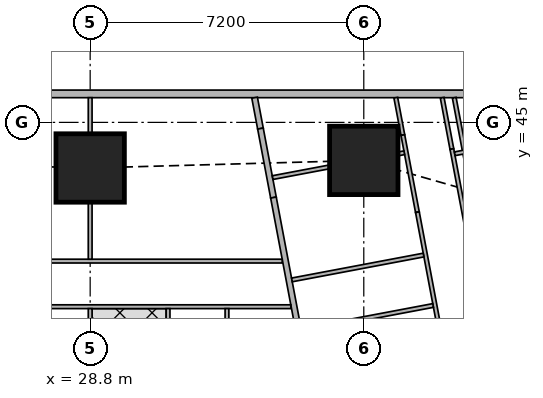
"""IFC4 building model, lengths in metres.
Left out: names, types, materials, properties, quantities, classifications, styles, units other than length and angle.
Written with IfcOpenShell. Run it as: python <this file> out.ifc"""

import sys

from ifc_helpers import new_model, si_unit, direction, frame, frame_2d, origin, origin_2d, place, context, subcontext, project, spatial, rectangle, extrude, element, fill, save


model = new_model("IFC4")
c1 = context("Model", 3, precision=1e-05, world=origin(), true_north=direction((0.0, 1.0)))
c2 = subcontext(c1, "Body", "Model", "MODEL_VIEW")
j1 = project(units=[si_unit("LENGTHUNIT", "METRE"), si_unit("PLANEANGLEUNIT", "RADIAN")], contexts=[c1])
p1 = place(None, origin())
s1 = spatial("IfcSite", under=j1, at=p1, CompositionType="ELEMENT")
p2 = place(p1, origin())
s2 = spatial("IfcBuilding", under=s1, at=p2, CompositionType="ELEMENT")
p3 = place(p2, frame((0.0, 0.0, 158.3)))
s3 = spatial("IfcBuildingStorey", under=s2, at=p3, CompositionType="ELEMENT", Elevation=158.3)
for number, where, z_axis, x_axis in (
    (1, (28.8, 43.8, 0.0), (0.0, 0.0, 1.0), (1.0, 0.0, 0.0)),
    (2, (36.0, 44.0, 0.0), (0.0, 0.0, 1.0), (1.0, 0.0, 0.0)),
):
    element("IfcColumn", number, at=place(p3, frame(where, z_axis=z_axis, x_axis=x_axis)), inside=s3, PredefinedType="COLUMN", context=c2, shape_type="SweptSolid", body=[
        extrude(rectangle(XDim=1.8, YDim=1.8, at=origin_2d()), origin(), (0.0, 0.0, 1.0), 3.75),
    ])
p4 = place(p3, frame((40.106, 45.75, 0.0), z_axis=(0.0, 0.0, 1.0), x_axis=(-1.0, 0.0, 0.0)))
e3 = element("IfcWall", 3, at=p4, inside=s3, PredefinedType="SOLIDWALL", context=c2, shape_type="SweptSolid", body=[
    extrude(rectangle(XDim=37.943, YDim=0.2, at=frame_2d((18.971, 0.0))), origin(), (0.0, 0.0, 1.0), 3.5),
])
p5 = place(p4, frame((8.606, 0.0, 0.9)))
e4 = element("IfcOpeningElement", 4, at=p5, cuts=e3, PredefinedType="OPENING", context=c2, shape_type="SweptSolid", body=[
    extrude(rectangle(XDim=1.8, YDim=1.5, at=frame_2d((0.9, 0.75))), frame((0.0, 0.11, 0.0), z_axis=(0.0, -1.0, 0.0), x_axis=(1.0, 0.0, 0.0)), (0.0, 0.0, 1.0), 0.22),
])
p6 = place(p4, frame((12.206, 0.0, 0.9)))
e5 = element("IfcOpeningElement", 5, at=p6, cuts=e3, PredefinedType="OPENING", context=c2, shape_type="SweptSolid", body=[
    extrude(rectangle(XDim=1.8, YDim=1.5, at=frame_2d((0.9, 0.75))), frame((0.0, 0.11, 0.0), z_axis=(0.0, -1.0, 0.0), x_axis=(1.0, 0.0, 0.0)), (0.0, 0.0, 1.0), 0.22),
])
p7 = place(p4, frame((15.806, 0.0, 0.9)))
e6 = element("IfcOpeningElement", 6, at=p7, cuts=e3, PredefinedType="OPENING", context=c2, shape_type="SweptSolid", body=[
    extrude(rectangle(XDim=1.8, YDim=1.5, at=frame_2d((0.9, 0.75))), frame((0.0, 0.11, 0.0), z_axis=(0.0, -1.0, 0.0), x_axis=(1.0, 0.0, 0.0)), (0.0, 0.0, 1.0), 0.22),
])
p8 = place(p4, frame((19.406, 0.0, 0.9)))
e7 = element("IfcOpeningElement", 7, at=p8, cuts=e3, PredefinedType="OPENING", context=c2, shape_type="SweptSolid", body=[
    extrude(rectangle(XDim=1.8, YDim=1.5, at=frame_2d((0.9, 0.75))), frame((0.0, 0.11, 0.0), z_axis=(0.0, -1.0, 0.0), x_axis=(1.0, 0.0, 0.0)), (0.0, 0.0, 1.0), 0.22),
])
p9 = place(p4, frame((23.006, 0.0, 0.9)))
e8 = element("IfcOpeningElement", 8, at=p9, cuts=e3, PredefinedType="OPENING", context=c2, shape_type="SweptSolid", body=[
    extrude(rectangle(XDim=1.8, YDim=1.5, at=frame_2d((0.9, 0.75))), frame((0.0, 0.11, 0.0), z_axis=(0.0, -1.0, 0.0), x_axis=(1.0, 0.0, 0.0)), (0.0, 0.0, 1.0), 0.22),
])
p10 = place(p4, frame((26.606, 0.0, 0.9)))
e9 = element("IfcOpeningElement", 9, at=p10, cuts=e3, PredefinedType="OPENING", context=c2, shape_type="SweptSolid", body=[
    extrude(rectangle(XDim=1.8, YDim=1.5, at=frame_2d((0.9, 0.75))), frame((0.0, 0.11, 0.0), z_axis=(0.0, -1.0, 0.0), x_axis=(1.0, 0.0, 0.0)), (0.0, 0.0, 1.0), 0.22),
])
p11 = place(p3, frame((33.127, 45.65, 0.0), z_axis=(0.0, 0.0, 1.0), x_axis=(0.186176514576, -0.982516313056, 0.0)))
e10 = element("IfcWall", 10, at=p11, inside=s3, PredefinedType="SOLIDWALL", context=c2, shape_type="SweptSolid", body=[
    extrude(rectangle(XDim=0.827, YDim=0.15, at=frame_2d((0.414, 0.0))), origin(), (0.0, 0.0, 1.0), 3.5),
])
p12 = place(p3, frame((33.281, 44.837, 0.0), z_axis=(0.0, 0.0, 1.0), x_axis=(0.185198323004, -0.982701165745, 0.0)))
e11 = element("IfcWall", 11, at=p12, inside=s3, PredefinedType="SOLIDWALL", context=c2, shape_type="SweptSolid", body=[
    extrude(rectangle(XDim=1.847, YDim=0.15, at=frame_2d((0.923, 0.0))), origin(), (0.0, 0.0, 1.0), 2.1),
])
p13 = place(p3, frame((33.623, 43.022, 0.0), z_axis=(0.0, 0.0, 1.0), x_axis=(0.185596841028, -0.98262597798, 0.0)))
e12 = element("IfcWall", 12, at=p13, inside=s3, PredefinedType="SOLIDWALL", context=c2, shape_type="SweptSolid", body=[
    extrude(rectangle(XDim=41.66, YDim=0.15, at=frame_2d((20.83, 0.0))), origin(), (0.0, 0.0, 1.0), 2.5),
])
p14 = place(p13, frame((21.514, 0.0, 0.0)))
e13 = element("IfcOpeningElement", 13, at=p14, cuts=e12, PredefinedType="OPENING", context=c2, shape_type="SweptSolid", body=[
    extrude(rectangle(XDim=1.0, YDim=2.1, at=frame_2d((0.5, 1.05))), frame((0.0, 0.085, 0.0), z_axis=(0.0, -1.0, 0.0), x_axis=(1.0, 0.0, 0.0)), (0.0, 0.0, 1.0), 0.17),
])
p15 = place(p13, frame((27.062, 0.0, 0.0)))
e14 = element("IfcOpeningElement", 14, at=p15, cuts=e12, PredefinedType="OPENING", context=c2, shape_type="SweptSolid", body=[
    extrude(rectangle(XDim=1.0, YDim=2.1, at=frame_2d((0.5, 1.05))), frame((0.0, 0.085, 0.0), z_axis=(0.0, -1.0, 0.0), x_axis=(1.0, 0.0, 0.0)), (0.0, 0.0, 1.0), 0.17),
])
p16 = place(p13, frame((29.934, 0.0, 0.0)))
e15 = element("IfcOpeningElement", 15, at=p16, cuts=e12, PredefinedType="OPENING", context=c2, shape_type="SweptSolid", body=[
    extrude(rectangle(XDim=1.0, YDim=2.1, at=frame_2d((0.5, 1.05))), frame((0.0, 0.085, 0.0), z_axis=(0.0, -1.0, 0.0), x_axis=(1.0, 0.0, 0.0)), (0.0, 0.0, 1.0), 0.17),
])
p17 = place(p3, frame((39.054, 42.085, 0.0), z_axis=(0.0, 0.0, 1.0), x_axis=(-0.185791584218, 0.982589175207, 0.0)))
e16 = element("IfcWall", 16, at=p17, inside=s3, PredefinedType="PARTITIONING", context=c2, shape_type="SweptSolid", body=[
    extrude(rectangle(XDim=3.628, YDim=0.1, at=frame_2d((1.814, 0.0))), origin(), (0.0, 0.0, 1.0), 2.1),
])
p18 = place(p3, frame((38.063, 45.65, 0.0), z_axis=(0.0, 0.0, 1.0), x_axis=(0.185456359766, -0.982652501458, 0.0)))
e17 = element("IfcWall", 17, at=p18, inside=s3, PredefinedType="PARTITIONING", context=c2, shape_type="SweptSolid", body=[
    extrude(rectangle(XDim=1.376, YDim=0.1, at=frame_2d((0.688, 0.0))), origin(), (0.0, 0.0, 1.0), 3.5),
])
p19 = place(p3, frame((38.318, 44.298, 0.0), z_axis=(0.0, 0.0, 1.0), x_axis=(0.185481135188, -0.982647825261, 0.0)))
e18 = element("IfcWall", 18, at=p19, inside=s3, PredefinedType="PARTITIONING", context=c2, shape_type="SweptSolid", body=[
    extrude(rectangle(XDim=2.064, YDim=0.1, at=frame_2d((1.032, 0.0))), origin(), (0.0, 0.0, 1.0), 2.1),
])
p20 = place(p3, frame((36.842, 45.65, 0.0), z_axis=(0.0, 0.0, 1.0), x_axis=(0.185789875365, -0.982589498322, 0.0)))
e19 = element("IfcWall", 19, at=p20, inside=s3, PredefinedType="PARTITIONING", context=c2, shape_type="SweptSolid", body=[
    extrude(rectangle(XDim=1.001, YDim=0.1, at=frame_2d((0.5, 0.0))), origin(), (0.0, 0.0, 1.0), 3.5),
])
p21 = place(p3, frame((37.028, 44.666, 0.0), z_axis=(0.0, 0.0, 1.0), x_axis=(0.185481135188, -0.982647825261, 0.0)))
e20 = element("IfcWall", 20, at=p21, inside=s3, PredefinedType="PARTITIONING", context=c2, shape_type="SweptSolid", body=[
    extrude(rectangle(XDim=2.064, YDim=0.1, at=frame_2d((1.032, 0.0))), origin(), (0.0, 0.0, 1.0), 2.1),
])
p22 = place(p3, frame((37.411, 42.638, 0.0), z_axis=(0.0, 0.0, 1.0), x_axis=(0.185554598549, -0.982633955732, 0.0)))
e21 = element("IfcWall", 21, at=p22, inside=s3, PredefinedType="PARTITIONING", context=c2, shape_type="SweptSolid", body=[
    extrude(rectangle(XDim=18.976, YDim=0.1, at=frame_2d((9.488, 0.0))), origin(), (0.0, 0.0, 1.0), 2.5),
])
p23 = place(p22, frame((17.551, 0.0, 0.0)))
e22 = element("IfcOpeningElement", 22, at=p23, cuts=e21, PredefinedType="OPENING", context=c2, shape_type="SweptSolid", body=[
    extrude(rectangle(XDim=0.9, YDim=2.1, at=frame_2d((0.45, 1.05))), frame((0.0, 0.06, 0.0), z_axis=(0.0, -1.0, 0.0), x_axis=(1.0, 0.0, 0.0)), (0.0, 0.0, 1.0), 0.12),
])
p24 = place(p22, frame((13.959, 0.0, 0.0)))
e23 = element("IfcOpeningElement", 23, at=p24, cuts=e21, PredefinedType="OPENING", context=c2, shape_type="SweptSolid", body=[
    extrude(rectangle(XDim=0.9, YDim=2.1, at=frame_2d((0.45, 1.05))), frame((0.0, 0.06, 0.0), z_axis=(0.0, -1.0, 0.0), x_axis=(1.0, 0.0, 0.0)), (0.0, 0.0, 1.0), 0.12),
])
p25 = place(p22, frame((10.092, 0.0, 0.0)))
e24 = element("IfcOpeningElement", 24, at=p25, cuts=e21, PredefinedType="OPENING", context=c2, shape_type="SweptSolid", body=[
    extrude(rectangle(XDim=0.9, YDim=2.1, at=frame_2d((0.45, 1.05))), frame((0.0, 0.06, 0.0), z_axis=(0.0, -1.0, 0.0), x_axis=(1.0, 0.0, 0.0)), (0.0, 0.0, 1.0), 0.12),
])
p26 = place(p22, frame((5.731, 0.0, 0.0)))
e25 = element("IfcOpeningElement", 25, at=p26, cuts=e21, PredefinedType="OPENING", context=c2, shape_type="SweptSolid", body=[
    extrude(rectangle(XDim=0.9, YDim=2.1, at=frame_2d((0.45, 1.05))), frame((0.0, 0.06, 0.0), z_axis=(0.0, -1.0, 0.0), x_axis=(1.0, 0.0, 0.0)), (0.0, 0.0, 1.0), 0.12),
])
p27 = place(p22, frame((3.188, 0.0, 0.0)))
e26 = element("IfcOpeningElement", 26, at=p27, cuts=e21, PredefinedType="OPENING", context=c2, shape_type="SweptSolid", body=[
    extrude(rectangle(XDim=0.9, YDim=2.1, at=frame_2d((0.45, 1.05))), frame((0.0, 0.06, 0.0), z_axis=(0.0, -1.0, 0.0), x_axis=(1.0, 0.0, 0.0)), (0.0, 0.0, 1.0), 0.12),
])
p28 = place(p22, frame((0.15, 0.0, 0.0)))
e27 = element("IfcOpeningElement", 27, at=p28, cuts=e21, PredefinedType="OPENING", context=c2, shape_type="SweptSolid", body=[
    extrude(rectangle(XDim=0.9, YDim=2.1, at=frame_2d((0.45, 1.05))), frame((0.0, 0.06, 0.0), z_axis=(0.0, -1.0, 0.0), x_axis=(1.0, 0.0, 0.0)), (0.0, 0.0, 1.0), 0.12),
])
p29 = place(p22, frame((15.642, 0.0, 0.0)))
e28 = element("IfcOpeningElement", 28, at=p29, cuts=e21, PredefinedType="OPENING", context=c2, shape_type="SweptSolid", body=[
    extrude(rectangle(XDim=0.9, YDim=2.1, at=frame_2d((0.45, 1.05))), frame((0.0, 0.06, 0.0), z_axis=(0.0, -1.0, 0.0), x_axis=(1.0, 0.0, 0.0)), (0.0, 0.0, 1.0), 0.12),
])
p30 = place(p22, frame((12.051, 0.0, 0.0)))
e29 = element("IfcOpeningElement", 29, at=p30, cuts=e21, PredefinedType="OPENING", context=c2, shape_type="SweptSolid", body=[
    extrude(rectangle(XDim=0.9, YDim=2.1, at=frame_2d((0.45, 1.05))), frame((0.0, 0.06, 0.0), z_axis=(0.0, -1.0, 0.0), x_axis=(1.0, 0.0, 0.0)), (0.0, 0.0, 1.0), 0.12),
])
p31 = place(p22, frame((8.185, 0.0, 0.0)))
e30 = element("IfcOpeningElement", 30, at=p31, cuts=e21, PredefinedType="OPENING", context=c2, shape_type="SweptSolid", body=[
    extrude(rectangle(XDim=0.9, YDim=2.1, at=frame_2d((0.45, 1.05))), frame((0.0, 0.06, 0.0), z_axis=(0.0, -1.0, 0.0), x_axis=(1.0, 0.0, 0.0)), (0.0, 0.0, 1.0), 0.12),
])
p32 = place(p3, frame((41.968, 44.85, 0.0), z_axis=(0.0, 0.0, 1.0), x_axis=(-0.98258614234, -0.185807623311, 0.0)))
e31 = element("IfcWall", 31, at=p32, inside=s3, PredefinedType="PARTITIONING", context=c2, shape_type="SweptSolid", body=[
    extrude(rectangle(XDim=3.638, YDim=0.1, at=frame_2d((1.819, 0.0))), origin(), (0.0, 0.0, 1.0), 2.1),
])
p33 = place(p3, frame((37.065, 44.201, 0.0), z_axis=(0.0, 0.0, 1.0), x_axis=(-0.983168876381, -0.182699098288, 0.0)))
e32 = element("IfcWall", 32, at=p33, inside=s3, PredefinedType="PARTITIONING", context=c2, shape_type="SweptSolid", body=[
    extrude(rectangle(XDim=0.158, YDim=0.1, at=frame_2d((0.079, 0.0))), origin(), (0.0, 0.0, 1.0), 2.1),
])
p34 = place(p3, frame((35.09, 43.828, 0.0), z_axis=(0.0, 0.0, 1.0), x_axis=(-0.982683801717, -0.185290436461, 0.0)))
e33 = element("IfcWall", 33, at=p34, inside=s3, PredefinedType="PARTITIONING", context=c2, shape_type="SweptSolid", body=[
    extrude(rectangle(XDim=1.515, YDim=0.1, at=frame_2d((0.758, 0.0))), origin(), (0.0, 0.0, 1.0), 2.1),
])
p35 = place(p3, frame((37.824, 40.182, 0.0), z_axis=(0.0, 0.0, 1.0), x_axis=(-0.982648794755, -0.185475998897, 0.0)))
e34 = element("IfcWall", 34, at=p35, inside=s3, PredefinedType="PARTITIONING", context=c2, shape_type="SweptSolid", body=[
    extrude(rectangle(XDim=3.525, YDim=0.1, at=frame_2d((1.763, 0.0))), origin(), (0.0, 0.0, 1.0), 3.5),
])
p36 = place(p3, frame((21.6, 41.35, 0.0), z_axis=(0.0, 0.0, 1.0), x_axis=(1.0, 0.0, 0.0)))
e35 = element("IfcWall", 35, at=p36, inside=s3, PredefinedType="PARTITIONING", context=c2, shape_type="SweptSolid", body=[
    extrude(rectangle(XDim=12.253, YDim=0.1, at=frame_2d((6.126, 0.0))), origin(), (0.0, 0.0, 1.0), 3.5),
])
p37 = place(p36, frame((0.2, 0.0, 0.0)))
e36 = element("IfcOpeningElement", 36, at=p37, cuts=e35, PredefinedType="OPENING", context=c2, shape_type="SweptSolid", body=[
    extrude(rectangle(XDim=0.9, YDim=2.1, at=frame_2d((0.45, 1.05))), frame((0.0, 0.06, 0.0), z_axis=(0.0, -1.0, 0.0), x_axis=(1.0, 0.0, 0.0)), (0.0, 0.0, 1.0), 0.12),
])
p38 = place(p36, frame((3.8, 0.0, 0.0)))
e37 = element("IfcOpeningElement", 37, at=p38, cuts=e35, PredefinedType="OPENING", context=c2, shape_type="SweptSolid", body=[
    extrude(rectangle(XDim=0.9, YDim=2.1, at=frame_2d((0.45, 1.05))), frame((0.0, 0.06, 0.0), z_axis=(0.0, -1.0, 0.0), x_axis=(1.0, 0.0, 0.0)), (0.0, 0.0, 1.0), 0.12),
])
p39 = place(p36, frame((7.4, 0.0, 0.0)))
e38 = element("IfcOpeningElement", 38, at=p39, cuts=e35, PredefinedType="OPENING", context=c2, shape_type="SweptSolid", body=[
    extrude(rectangle(XDim=0.9, YDim=2.1, at=frame_2d((0.45, 1.05))), frame((0.0, 0.06, 0.0), z_axis=(0.0, -1.0, 0.0), x_axis=(1.0, 0.0, 0.0)), (0.0, 0.0, 1.0), 0.12),
])
p40 = place(p3, frame((21.6, 40.15, 0.0), z_axis=(0.0, 0.0, 1.0), x_axis=(1.0, 0.0, 0.0)))
e39 = element("IfcWall", 39, at=p40, inside=s3, PredefinedType="PARTITIONING", context=c2, shape_type="SweptSolid", body=[
    extrude(rectangle(XDim=12.48, YDim=0.1, at=frame_2d((6.24, 0.0))), origin(), (0.0, 0.0, 1.0), 3.5),
])
p41 = place(p40, frame((0.4, 0.0, 0.0)))
e40 = element("IfcOpeningElement", 40, at=p41, cuts=e39, PredefinedType="OPENING", context=c2, shape_type="SweptSolid", body=[
    extrude(rectangle(XDim=0.9, YDim=2.1, at=frame_2d((0.45, 1.05))), frame((0.0, 0.06, 0.0), z_axis=(0.0, -1.0, 0.0), x_axis=(1.0, 0.0, 0.0)), (0.0, 0.0, 1.0), 0.12),
])
p42 = place(p40, frame((5.549, 0.0, 0.0)))
e41 = element("IfcOpeningElement", 41, at=p42, cuts=e39, PredefinedType="OPENING", context=c2, shape_type="SweptSolid", body=[
    extrude(rectangle(XDim=0.9, YDim=2.1, at=frame_2d((0.45, 1.05))), frame((0.0, 0.06, 0.0), z_axis=(0.0, -1.0, 0.0), x_axis=(1.0, 0.0, 0.0)), (0.0, 0.0, 1.0), 0.12),
])
p43 = place(p40, frame((7.775, 0.0, 0.0)))
e42 = element("IfcOpeningElement", 42, at=p43, cuts=e39, PredefinedType="OPENING", context=c2, shape_type="SweptSolid", body=[
    extrude(rectangle(XDim=0.9, YDim=2.1, at=frame_2d((0.45, 1.05))), frame((0.0, 0.06, 0.0), z_axis=(0.0, -1.0, 0.0), x_axis=(1.0, 0.0, 0.0)), (0.0, 0.0, 1.0), 0.12),
])
p44 = place(p40, frame((11.43, 0.0, 0.0)))
e43 = element("IfcOpeningElement", 43, at=p44, cuts=e39, PredefinedType="OPENING", context=c2, shape_type="SweptSolid", body=[
    extrude(rectangle(XDim=0.9, YDim=2.1, at=frame_2d((0.45, 1.05))), frame((0.0, 0.06, 0.0), z_axis=(0.0, -1.0, 0.0), x_axis=(1.0, 0.0, 0.0)), (0.0, 0.0, 1.0), 0.12),
])
p45 = place(p40, frame((2.799, 0.0, 0.0)))
e44 = element("IfcOpeningElement", 44, at=p45, cuts=e39, PredefinedType="OPENING", context=c2, shape_type="SweptSolid", body=[
    extrude(rectangle(XDim=0.9, YDim=2.1, at=frame_2d((0.45, 1.05))), frame((0.0, 0.06, 0.0), z_axis=(0.0, -1.0, 0.0), x_axis=(1.0, 0.0, 0.0)), (0.0, 0.0, 1.0), 0.12),
])
p46 = place(p40, frame((9.575, 0.0, 0.0)))
e45 = element("IfcOpeningElement", 45, at=p46, cuts=e39, PredefinedType="OPENING", context=c2, shape_type="SweptSolid", body=[
    extrude(rectangle(XDim=0.9, YDim=2.1, at=frame_2d((0.45, 1.05))), frame((0.0, 0.06, 0.0), z_axis=(0.0, -1.0, 0.0), x_axis=(1.0, 0.0, 0.0)), (0.0, 0.0, 1.0), 0.12),
])
p47 = place(p3, frame((28.8, 41.4, 0.0), z_axis=(0.0, 0.0, 1.0), x_axis=(0.0, 1.0, 0.0)))
e46 = element("IfcWall", 46, at=p47, inside=s3, PredefinedType="PARTITIONING", context=c2, shape_type="SweptSolid", body=[
    extrude(rectangle(XDim=1.499, YDim=0.1, at=frame_2d((0.75, 0.0))), origin(), (0.0, 0.0, 1.0), 3.5),
])
p48 = place(p3, frame((28.8, 44.701, 0.0), z_axis=(0.0, 0.0, 1.0), x_axis=(0.0, 1.0, 0.0)))
e47 = element("IfcWall", 47, at=p48, inside=s3, PredefinedType="PARTITIONING", context=c2, shape_type="SweptSolid", body=[
    extrude(rectangle(XDim=0.949, YDim=0.1, at=frame_2d((0.475, 0.0))), origin(), (0.0, 0.0, 1.0), 3.5),
])
p49 = place(p3, frame((28.8, 38.251, 0.0), z_axis=(0.0, 0.0, 1.0), x_axis=(0.0, 1.0, 0.0)))
e48 = element("IfcWall", 48, at=p49, inside=s3, PredefinedType="PARTITIONING", context=c2, shape_type="SweptSolid", body=[
    extrude(rectangle(XDim=1.849, YDim=0.1, at=frame_2d((0.925, 0.0))), origin(), (0.0, 0.0, 1.0), 3.5),
])
for number, where, z_axis, x_axis in (
    (49, (32.4, 36.575, 0.0), (0.0, 0.0, 1.0), (0.0, 1.0, 0.0)),
    (50, (30.85, 36.575, 0.0), (0.0, 0.0, 1.0), (0.0, 1.0, 0.0)),
):
    element("IfcWall", number, at=place(p3, frame(where, z_axis=z_axis, x_axis=x_axis)), inside=s3, PredefinedType="PARTITIONING", context=c2, shape_type="SweptSolid", body=[
        extrude(rectangle(XDim=3.525, YDim=0.1, at=frame_2d((1.763, 0.0))), origin(), (0.0, 0.0, 1.0), 3.5),
    ])
p50 = place(p3, frame((37.573, 41.509, 0.0), z_axis=(0.0, 0.0, 1.0), x_axis=(-0.982638553676, -0.185530247748, 0.0)))
e51 = element("IfcWall", 51, at=p50, inside=s3, PredefinedType="PARTITIONING", context=c2, shape_type="SweptSolid", body=[
    extrude(rectangle(XDim=3.525, YDim=0.1, at=frame_2d((1.763, 0.0))), origin(), (0.0, 0.0, 1.0), 3.5),
])
p51 = place(p50, frame((1.325, 0.0, 0.0)))
e52 = element("IfcOpeningElement", 52, at=p51, cuts=e51, PredefinedType="OPENING", context=c2, shape_type="SweptSolid", body=[
    extrude(rectangle(XDim=0.9, YDim=2.1, at=frame_2d((0.45, 1.05))), frame((0.0, 0.06, 0.0), z_axis=(0.0, -1.0, 0.0), x_axis=(1.0, 0.0, 0.0)), (0.0, 0.0, 1.0), 0.12),
])
p52 = place(p5, origin())
e53 = element("IfcWindow", 53, at=p52, inside=s3, PartitioningType="SINGLE_PANEL", PredefinedType="WINDOW", context=c2, shape_type="SweptSolid", body=[
    extrude(rectangle(XDim=1.8, YDim=1.5, at=frame_2d((0.9, 0.75))), frame((0.0, 0.03, 0.0), z_axis=(0.0, -1.0, 0.0), x_axis=(1.0, 0.0, 0.0)), (0.0, 0.0, 1.0), 0.06),
])
fill(e4, e53)
p53 = place(p6, origin())
e54 = element("IfcWindow", 54, at=p53, inside=s3, PartitioningType="SINGLE_PANEL", PredefinedType="WINDOW", context=c2, shape_type="SweptSolid", body=[
    extrude(rectangle(XDim=1.8, YDim=1.5, at=frame_2d((0.9, 0.75))), frame((0.0, 0.03, 0.0), z_axis=(0.0, -1.0, 0.0), x_axis=(1.0, 0.0, 0.0)), (0.0, 0.0, 1.0), 0.06),
])
fill(e5, e54)
p54 = place(p28, origin())
e55 = element("IfcDoor", 55, at=p54, inside=s3, OperationType="SINGLE_SWING_RIGHT", PredefinedType="DOOR", context=c2, shape_type="SweptSolid", body=[
    extrude(rectangle(XDim=0.9, YDim=2.1, at=frame_2d((0.45, 1.05))), frame((0.0, 0.025, 0.0), z_axis=(0.0, -1.0, 0.0), x_axis=(1.0, 0.0, 0.0)), (0.0, 0.0, 1.0), 0.05),
])
fill(e27, e55)
p55 = place(p39, origin())
e56 = element("IfcDoor", 56, at=p55, inside=s3, OperationType="SINGLE_SWING_LEFT", PredefinedType="DOOR", context=c2, shape_type="SweptSolid", body=[
    extrude(rectangle(XDim=0.9, YDim=2.1, at=frame_2d((0.45, 1.05))), frame((0.0, 0.025, 0.0), z_axis=(0.0, -1.0, 0.0), x_axis=(1.0, 0.0, 0.0)), (0.0, 0.0, 1.0), 0.05),
])
fill(e38, e56)
p56 = place(p42, origin())
e57 = element("IfcDoor", 57, at=p56, inside=s3, OperationType="SINGLE_SWING_LEFT", PredefinedType="DOOR", context=c2, shape_type="SweptSolid", body=[
    extrude(rectangle(XDim=0.9, YDim=2.1, at=frame_2d((0.45, 1.05))), frame((0.0, 0.025, 0.0), z_axis=(0.0, -1.0, 0.0), x_axis=(1.0, 0.0, 0.0)), (0.0, 0.0, 1.0), 0.05),
])
fill(e41, e57)
p57 = place(p43, origin())
e58 = element("IfcDoor", 58, at=p57, inside=s3, OperationType="SINGLE_SWING_LEFT", PredefinedType="DOOR", context=c2, shape_type="SweptSolid", body=[
    extrude(rectangle(XDim=0.9, YDim=2.1, at=frame_2d((0.45, 1.05))), frame((0.0, 0.025, 0.0), z_axis=(0.0, -1.0, 0.0), x_axis=(1.0, 0.0, 0.0)), (0.0, 0.0, 1.0), 0.05),
])
fill(e42, e58)
p58 = place(p44, origin())
e59 = element("IfcDoor", 59, at=p58, inside=s3, OperationType="SINGLE_SWING_LEFT", PredefinedType="DOOR", context=c2, shape_type="SweptSolid", body=[
    extrude(rectangle(XDim=0.9, YDim=2.1, at=frame_2d((0.45, 1.05))), frame((0.0, 0.025, 0.0), z_axis=(0.0, -1.0, 0.0), x_axis=(1.0, 0.0, 0.0)), (0.0, 0.0, 1.0), 0.05),
])
fill(e43, e59)
p59 = place(p46, origin())
e60 = element("IfcDoor", 60, at=p59, inside=s3, OperationType="SINGLE_SWING_RIGHT", PredefinedType="DOOR", context=c2, shape_type="SweptSolid", body=[
    extrude(rectangle(XDim=0.9, YDim=2.1, at=frame_2d((0.45, 1.05))), frame((0.0, 0.025, 0.0), z_axis=(0.0, -1.0, 0.0), x_axis=(1.0, 0.0, 0.0)), (0.0, 0.0, 1.0), 0.05),
])
fill(e45, e60)
p60 = place(p51, origin())
e61 = element("IfcDoor", 61, at=p60, inside=s3, OperationType="SINGLE_SWING_LEFT", PredefinedType="DOOR", context=c2, shape_type="SweptSolid", body=[
    extrude(rectangle(XDim=0.9, YDim=2.1, at=frame_2d((0.45, 1.05))), frame((0.0, 0.025, 0.0), z_axis=(0.0, -1.0, 0.0), x_axis=(1.0, 0.0, 0.0)), (0.0, 0.0, 1.0), 0.05),
])
fill(e52, e61)
save(model, sys.argv[1])
